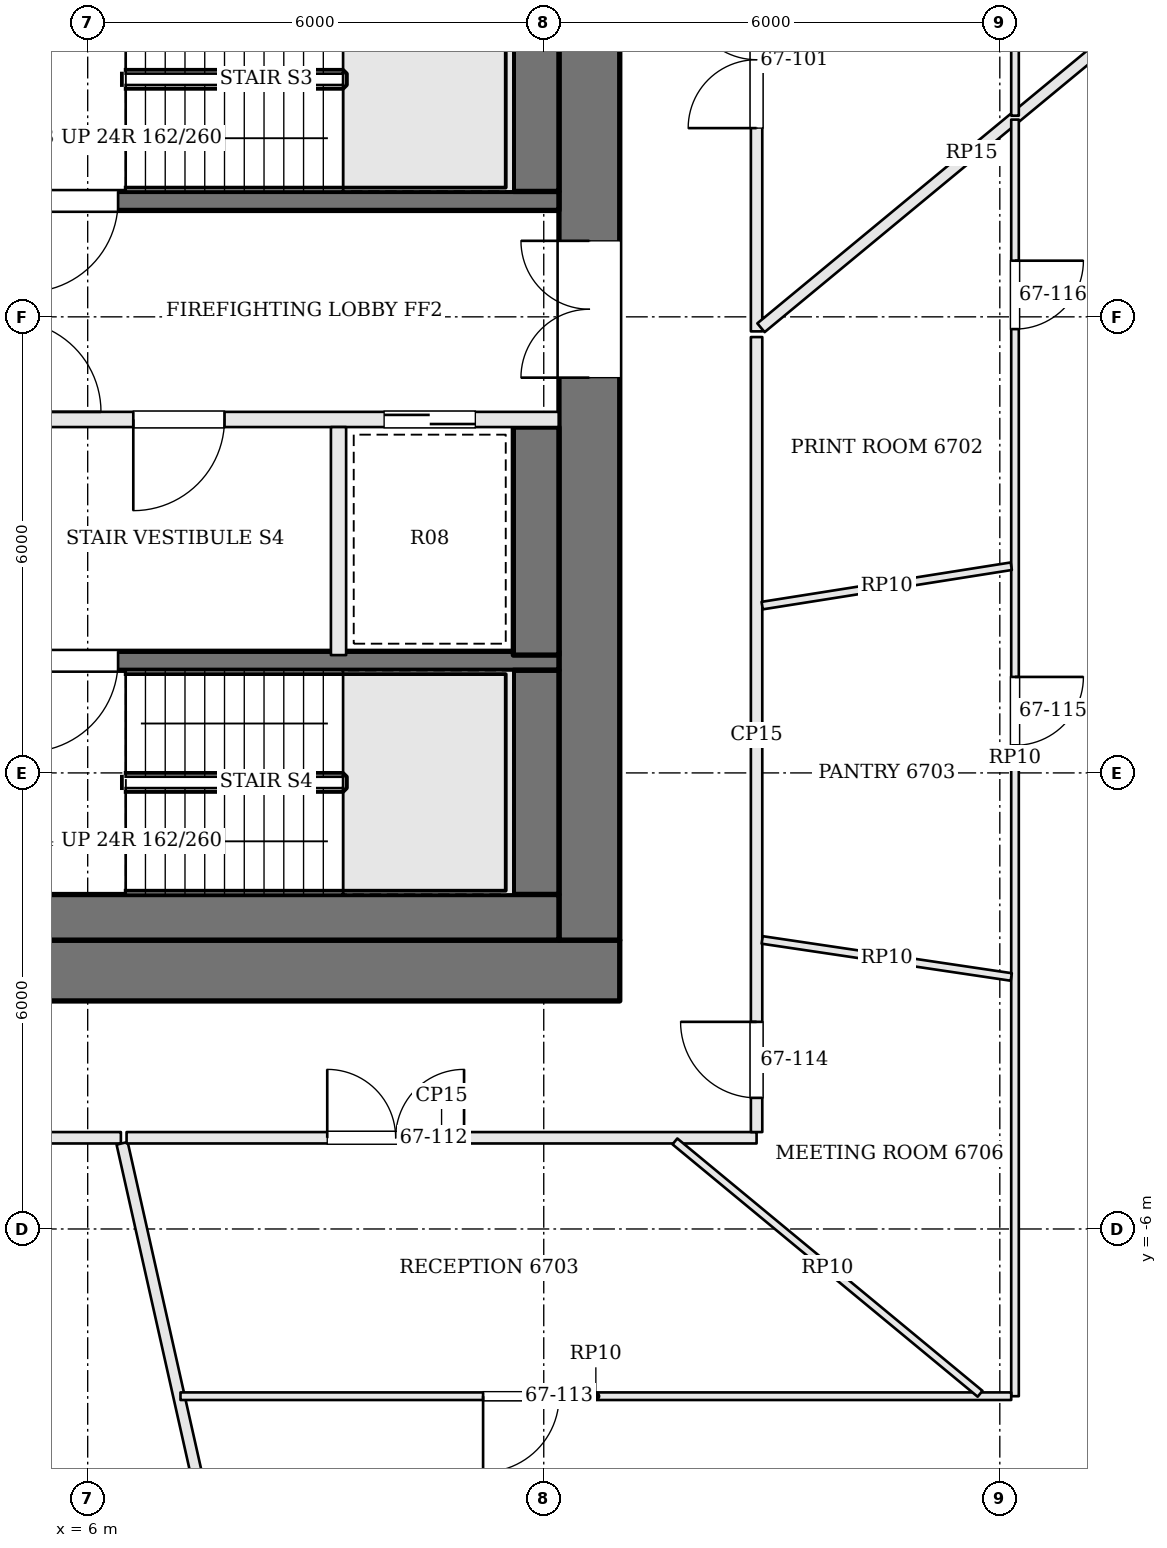
"""IFC4 building model, lengths in metres.
Left out: names, types, materials, properties, quantities, classifications, styles, units other than length and angle.
Written with IfcOpenShell. Run it as: python <this file> out.ifc"""

import sys

from ifc_helpers import new_model, si_unit, direction, frame, frame_2d, origin, place, context, subcontext, project, spatial, rectangle, extrude, element, fill, save


model = new_model("IFC4")
c1 = context("Model", 3, precision=1e-05, world=origin(), true_north=direction((0.0, 1.0)))
c2 = subcontext(c1, "Body", "Model", "MODEL_VIEW")
j1 = project(units=[si_unit("LENGTHUNIT", "METRE"), si_unit("PLANEANGLEUNIT", "RADIAN")], contexts=[c1])
p1 = place(None, origin())
s1 = spatial("IfcSite", under=j1, at=p1, CompositionType="ELEMENT")
p2 = place(p1, origin())
s2 = spatial("IfcBuilding", under=s1, at=p2, CompositionType="ELEMENT")
p3 = place(p2, frame((0.0, 0.0, 272.7)))
s3 = spatial("IfcBuildingStorey", under=s2, at=p3, CompositionType="ELEMENT", Elevation=272.7)
p4 = place(p3, frame((-13.0, -2.6, 0.0), z_axis=(0.0, 0.0, 1.0), x_axis=(1.0, 0.0, 0.0)))
e1 = element("IfcWall", 1, at=p4, inside=s3, PredefinedType="SHEAR", context=c2, shape_type="SweptSolid", body=[
    extrude(rectangle(XDim=26.0, YDim=0.8, at=frame_2d((13.0, 0.0))), origin(), (0.0, 0.0, 1.0), 3.9),
])
p5 = place(p4, frame((9.475, 0.0, 0.0)))
e2 = element("IfcOpeningElement", 2, at=p5, cuts=e1, PredefinedType="OPENING", context=c2, shape_type="SweptSolid", body=[
    extrude(rectangle(XDim=0.9, YDim=2.1, at=frame_2d((0.45, 1.05))), frame((0.0, 0.41, 0.0), z_axis=(0.0, -1.0, 0.0), x_axis=(1.0, 0.0, 0.0)), (0.0, 0.0, 1.0), 0.82),
])
p6 = place(p4, frame((12.75, 0.0, 0.0)))
e3 = element("IfcOpeningElement", 3, at=p6, cuts=e1, PredefinedType="OPENING", context=c2, shape_type="SweptSolid", body=[
    extrude(rectangle(XDim=0.9, YDim=2.1, at=frame_2d((0.45, 1.05))), frame((0.0, 0.41, 0.0), z_axis=(0.0, -1.0, 0.0), x_axis=(1.0, 0.0, 0.0)), (0.0, 0.0, 1.0), 0.82),
])
p7 = place(p4, frame((15.05, 0.0, 0.0)))
e4 = element("IfcOpeningElement", 4, at=p7, cuts=e1, PredefinedType="OPENING", context=c2, shape_type="SweptSolid", body=[
    extrude(rectangle(XDim=1.0, YDim=2.1, at=frame_2d((0.5, 1.05))), frame((0.0, 0.41, 0.0), z_axis=(0.0, -1.0, 0.0), x_axis=(1.0, 0.0, 0.0)), (0.0, 0.0, 1.0), 0.82),
])
p8 = place(p4, frame((16.825, 0.0, 0.0)))
e5 = element("IfcOpeningElement", 5, at=p8, cuts=e1, PredefinedType="OPENING", context=c2, shape_type="SweptSolid", body=[
    extrude(rectangle(XDim=0.7, YDim=2.1, at=frame_2d((0.35, 1.05))), frame((0.0, 0.41, 0.0), z_axis=(0.0, -1.0, 0.0), x_axis=(1.0, 0.0, 0.0)), (0.0, 0.0, 1.0), 0.82),
])
p9 = place(p3, frame((12.6, -2.2, 0.0), z_axis=(0.0, 0.0, 1.0), x_axis=(0.0, 1.0, 0.0)))
e6 = element("IfcWall", 6, at=p9, inside=s3, PredefinedType="SHEAR", context=c2, shape_type="SweptSolid", body=[
    extrude(rectangle(XDim=13.4, YDim=0.8, at=frame_2d((6.7, 0.0))), origin(), (0.0, 0.0, 1.0), 3.9),
])
p10 = place(p9, frame((7.4, 0.0, 0.0)))
e7 = element("IfcOpeningElement", 7, at=p10, cuts=e6, PredefinedType="OPENING", context=c2, shape_type="SweptSolid", body=[
    extrude(rectangle(XDim=1.8, YDim=2.1, at=frame_2d((0.9, 1.05))), frame((0.0, 0.41, 0.0), z_axis=(0.0, -1.0, 0.0), x_axis=(1.0, 0.0, 0.0)), (0.0, 0.0, 1.0), 0.82),
])
p11 = place(p3, frame((12.2, 7.525, 0.0), z_axis=(0.0, 0.0, 1.0), x_axis=(-1.0, 0.0, 0.0)))
e8 = element("IfcWall", 8, at=p11, inside=s3, PredefinedType="SOLIDWALL", context=c2, shape_type="SweptSolid", body=[
    extrude(rectangle(XDim=7.1, YDim=0.25, at=frame_2d((3.55, 0.0))), origin(), (0.0, 0.0, 1.0), 3.7),
])
p12 = place(p11, frame((5.8, 0.0, 0.0)))
e9 = element("IfcOpeningElement", 9, at=p12, cuts=e8, PredefinedType="OPENING", context=c2, shape_type="SweptSolid", body=[
    extrude(rectangle(XDim=1.2, YDim=2.1, at=frame_2d((0.6, 1.05))), frame((0.0, 0.135, 0.0), z_axis=(0.0, -1.0, 0.0), x_axis=(1.0, 0.0, 0.0)), (0.0, 0.0, 1.0), 0.27),
])
p13 = place(p3, frame((12.2, 4.65, 0.0), z_axis=(0.0, 0.0, 1.0), x_axis=(-1.0, 0.0, 0.0)))
e10 = element("IfcWall", 10, at=p13, inside=s3, PredefinedType="SOLIDWALL", context=c2, shape_type="SweptSolid", body=[
    extrude(rectangle(XDim=7.1, YDim=0.2, at=frame_2d((3.55, 0.0))), origin(), (0.0, 0.0, 1.0), 3.7),
])
p14 = place(p13, frame((4.4, 0.0, 0.0)))
e11 = element("IfcOpeningElement", 11, at=p14, cuts=e10, PredefinedType="OPENING", context=c2, shape_type="SweptSolid", body=[
    extrude(rectangle(XDim=1.2, YDim=2.1, at=frame_2d((0.6, 1.05))), frame((0.0, 0.11, 0.0), z_axis=(0.0, -1.0, 0.0), x_axis=(1.0, 0.0, 0.0)), (0.0, 0.0, 1.0), 0.22),
])
p15 = place(p13, frame((1.1, 0.0, 0.0)))
e12 = element("IfcOpeningElement", 12, at=p15, cuts=e10, PredefinedType="OPENING", context=c2, shape_type="SweptSolid", body=[
    extrude(rectangle(XDim=1.2, YDim=2.1, at=frame_2d((0.6, 1.05))), frame((0.0, 0.11, 0.0), z_axis=(0.0, -1.0, 0.0), x_axis=(1.0, 0.0, 0.0)), (0.0, 0.0, 1.0), 0.22),
])
p16 = place(p3, frame((12.2, 1.475, 0.0), z_axis=(0.0, 0.0, 1.0), x_axis=(-1.0, 0.0, 0.0)))
e13 = element("IfcWall", 13, at=p16, inside=s3, PredefinedType="SOLIDWALL", context=c2, shape_type="SweptSolid", body=[
    extrude(rectangle(XDim=7.1, YDim=0.25, at=frame_2d((3.55, 0.0))), origin(), (0.0, 0.0, 1.0), 3.7),
])
p17 = place(p16, frame((5.8, 0.0, 0.0)))
e14 = element("IfcOpeningElement", 14, at=p17, cuts=e13, PredefinedType="OPENING", context=c2, shape_type="SweptSolid", body=[
    extrude(rectangle(XDim=1.2, YDim=2.1, at=frame_2d((0.6, 1.05))), frame((0.0, 0.135, 0.0), z_axis=(0.0, -1.0, 0.0), x_axis=(1.0, 0.0, 0.0)), (0.0, 0.0, 1.0), 0.27),
])
p18 = place(p3, frame((9.3, 4.55, 0.0), z_axis=(0.0, 0.0, 1.0), x_axis=(0.0, -1.0, 0.0)))
e15 = element("IfcWall", 15, at=p18, inside=s3, PredefinedType="SOLIDWALL", context=c2, shape_type="SweptSolid", body=[
    extrude(rectangle(XDim=3.0, YDim=0.2, at=frame_2d((1.5, 0.0))), origin(), (0.0, 0.0, 1.0), 3.7),
])
p19 = place(p3, frame((11.9, 10.6, 0.0), z_axis=(0.0, 0.0, 1.0), x_axis=(0.0, -1.0, 0.0)))
e16 = element("IfcWall", 16, at=p19, inside=s3, PredefinedType="SOLIDWALL", context=c2, shape_type="SweptSolid", body=[
    extrude(rectangle(XDim=2.95, YDim=0.6, at=frame_2d((1.475, 0.0))), origin(), (0.0, 0.0, 1.0), 3.7),
])
p20 = place(p3, frame((11.9, 4.55, 0.0), z_axis=(0.0, 0.0, 1.0), x_axis=(0.0, -1.0, 0.0)))
e17 = element("IfcWall", 17, at=p20, inside=s3, PredefinedType="SOLIDWALL", context=c2, shape_type="SweptSolid", body=[
    extrude(rectangle(XDim=3.0, YDim=0.6, at=frame_2d((1.5, 0.0))), origin(), (0.0, 0.0, 1.0), 3.7),
])
p21 = place(p3, frame((11.9, 1.35, 0.0), z_axis=(0.0, 0.0, 1.0), x_axis=(0.0, -1.0, 0.0)))
e18 = element("IfcWall", 18, at=p21, inside=s3, PredefinedType="SOLIDWALL", context=c2, shape_type="SweptSolid", body=[
    extrude(rectangle(XDim=2.95, YDim=0.6, at=frame_2d((1.475, 0.0))), origin(), (0.0, 0.0, 1.0), 3.7),
])
p22 = place(p3, frame((12.2, -1.9, 0.0), z_axis=(0.0, 0.0, 1.0), x_axis=(-1.0, 0.0, 0.0)))
e19 = element("IfcWall", 19, at=p22, inside=s3, PredefinedType="SOLIDWALL", context=c2, shape_type="SweptSolid", body=[
    extrude(rectangle(XDim=7.1, YDim=0.6, at=frame_2d((3.55, 0.0))), origin(), (0.0, 0.0, 1.0), 3.7),
])
p23 = place(p3, frame((14.8, 5.809, 0.0), z_axis=(0.0, 0.0, 1.0), x_axis=(0.0, 1.0, 0.0)))
e20 = element("IfcWall", 20, at=p23, inside=s3, PredefinedType="PARTITIONING", context=c2, shape_type="SweptSolid", body=[
    extrude(rectangle(XDim=7.991, YDim=0.15, at=frame_2d((3.996, 0.0))), origin(), (0.0, 0.0, 1.0), 3.198),
])
p24 = place(p23, frame((2.674, 0.0, 0.0)))
e21 = element("IfcOpeningElement", 21, at=p24, cuts=e20, PredefinedType="OPENING", context=c2, shape_type="SweptSolid", body=[
    extrude(rectangle(XDim=1.8, YDim=2.1, at=frame_2d((0.9, 1.05))), frame((0.0, 0.085, 0.0), z_axis=(0.0, -1.0, 0.0), x_axis=(1.0, 0.0, 0.0)), (0.0, 0.0, 1.0), 0.17),
])
p25 = place(p3, frame((20.403, 10.442, 0.0), z_axis=(0.0, 0.0, 1.0), x_axis=(-0.770613226955, -0.637303110334, 0.0)))
e22 = element("IfcWall", 22, at=p25, inside=s3, PredefinedType="PARTITIONING", context=c2, shape_type="SweptSolid", body=[
    extrude(rectangle(XDim=7.196, YDim=0.15, at=frame_2d((3.598, 0.0))), origin(), (0.0, 0.0, 1.0), 3.198),
])
p26 = place(p3, frame((-13.76, -4.8, 0.0), z_axis=(0.0, 0.0, 1.0), x_axis=(1.0, 0.0, 0.0)))
e23 = element("IfcWall", 23, at=p26, inside=s3, PredefinedType="PARTITIONING", context=c2, shape_type="SweptSolid", body=[
    extrude(rectangle(XDim=20.197, YDim=0.15, at=frame_2d((10.099, 0.0))), origin(), (0.0, 0.0, 1.0), 3.198),
])
p27 = place(p26, frame((9.161, 0.0, 0.0)))
e24 = element("IfcOpeningElement", 24, at=p27, cuts=e23, PredefinedType="OPENING", context=c2, shape_type="SweptSolid", body=[
    extrude(rectangle(XDim=1.8, YDim=2.1, at=frame_2d((0.9, 1.05))), frame((0.0, 0.085, 0.0), z_axis=(0.0, -1.0, 0.0), x_axis=(1.0, 0.0, 0.0)), (0.0, 0.0, 1.0), 0.17),
])
p28 = place(p3, frame((9.286, -17.485, 0.0), z_axis=(0.0, 0.0, 1.0), x_axis=(-0.219205673421, 0.975678672894, 0.0)))
e25 = element("IfcWall", 25, at=p28, inside=s3, PredefinedType="PARTITIONING", context=c2, shape_type="SweptSolid", body=[
    extrude(rectangle(XDim=12.926, YDim=0.15, at=frame_2d((6.463, 0.0))), origin(), (0.0, 0.0, 1.0), 3.198),
])
p29 = place(p3, frame((6.512, -4.8, 0.0), z_axis=(0.0, 0.0, 1.0), x_axis=(1.0, 0.0, 0.0)))
e26 = element("IfcWall", 26, at=p29, inside=s3, PredefinedType="PARTITIONING", context=c2, shape_type="SweptSolid", body=[
    extrude(rectangle(XDim=8.288, YDim=0.15, at=frame_2d((4.144, 0.0))), origin(), (0.0, 0.0, 1.0), 3.198),
])
p30 = place(p29, frame((2.64, 0.0, 0.0)))
e27 = element("IfcOpeningElement", 27, at=p30, cuts=e26, PredefinedType="OPENING", context=c2, shape_type="SweptSolid", body=[
    extrude(rectangle(XDim=1.8, YDim=2.1, at=frame_2d((0.9, 1.05))), frame((0.0, 0.085, 0.0), z_axis=(0.0, -1.0, 0.0), x_axis=(1.0, 0.0, 0.0)), (0.0, 0.0, 1.0), 0.17),
])
p31 = place(p3, frame((14.8, -4.725, 0.0), z_axis=(0.0, 0.0, 1.0), x_axis=(0.0, 1.0, 0.0)))
e28 = element("IfcWall", 28, at=p31, inside=s3, PredefinedType="PARTITIONING", context=c2, shape_type="SweptSolid", body=[
    extrude(rectangle(XDim=10.459, YDim=0.15, at=frame_2d((5.229, 0.0))), origin(), (0.0, 0.0, 1.0), 3.198),
])
p32 = place(p31, frame((0.45, 0.0, 0.0)))
e29 = element("IfcOpeningElement", 29, at=p32, cuts=e28, PredefinedType="OPENING", context=c2, shape_type="SweptSolid", body=[
    extrude(rectangle(XDim=1.0, YDim=2.4, at=frame_2d((0.5, 1.2))), frame((0.0, 0.085, 0.0), z_axis=(0.0, -1.0, 0.0), x_axis=(1.0, 0.0, 0.0)), (0.0, 0.0, 1.0), 0.17),
])
p33 = place(p3, frame((18.2, 12.158, 0.0), z_axis=(0.0, 0.0, 1.0), x_axis=(0.0, -1.0, 0.0)))
e30 = element("IfcWall", 30, at=p33, inside=s3, PredefinedType="PARTITIONING", context=c2, shape_type="SweptSolid", body=[
    extrude(rectangle(XDim=3.512, YDim=0.1, at=frame_2d((1.756, 0.0))), origin(), (0.0, 0.0, 1.0), 3.184),
])
p34 = place(p3, frame((18.2, 8.595, 0.0), z_axis=(0.0, 0.0, 1.0), x_axis=(0.0, -1.0, 0.0)))
e31 = element("IfcWall", 31, at=p34, inside=s3, PredefinedType="PARTITIONING", context=c2, shape_type="SweptSolid", body=[
    extrude(rectangle(XDim=16.795, YDim=0.1, at=frame_2d((8.397, 0.0))), origin(), (0.0, 0.0, 1.0), 3.184),
])
p35 = place(p34, frame((7.332, 0.0, 0.0)))
e32 = element("IfcOpeningElement", 32, at=p35, cuts=e31, PredefinedType="OPENING", context=c2, shape_type="SweptSolid", body=[
    extrude(rectangle(XDim=0.9, YDim=2.1, at=frame_2d((0.45, 1.05))), frame((0.0, 0.06, 0.0), z_axis=(0.0, -1.0, 0.0), x_axis=(1.0, 0.0, 0.0)), (0.0, 0.0, 1.0), 0.12),
])
p36 = place(p34, frame((1.856, 0.0, 0.0)))
e33 = element("IfcOpeningElement", 33, at=p36, cuts=e31, PredefinedType="OPENING", context=c2, shape_type="SweptSolid", body=[
    extrude(rectangle(XDim=0.9, YDim=2.1, at=frame_2d((0.45, 1.05))), frame((0.0, 0.06, 0.0), z_axis=(0.0, -1.0, 0.0), x_axis=(1.0, 0.0, 0.0)), (0.0, 0.0, 1.0), 0.12),
])
p37 = place(p3, frame((18.15, -8.2, 0.0), z_axis=(0.0, 0.0, 1.0), x_axis=(-1.0, 0.0, 0.0)))
e34 = element("IfcWall", 34, at=p37, inside=s3, PredefinedType="PARTITIONING", context=c2, shape_type="SweptSolid", body=[
    extrude(rectangle(XDim=10.929, YDim=0.1, at=frame_2d((5.464, 0.0))), origin(), (0.0, 0.0, 1.0), 3.184),
])
p38 = place(p37, frame((5.948, 0.0, 0.0)))
e35 = element("IfcOpeningElement", 35, at=p38, cuts=e34, PredefinedType="OPENING", context=c2, shape_type="SweptSolid", body=[
    extrude(rectangle(XDim=1.0, YDim=2.1, at=frame_2d((0.5, 1.05))), frame((0.0, 0.06, 0.0), z_axis=(0.0, -1.0, 0.0), x_axis=(1.0, 0.0, 0.0)), (0.0, 0.0, 1.0), 0.12),
])
p39 = place(p3, frame((13.726, -4.848, 0.0), z_axis=(0.0, 0.0, 1.0), x_axis=(0.770597471598, -0.637322160894, 0.0)))
e36 = element("IfcWall", 36, at=p39, inside=s3, PredefinedType="PARTITIONING", context=c2, shape_type="SweptSolid", body=[
    extrude(rectangle(XDim=5.21, YDim=0.1, at=frame_2d((2.605, 0.0))), origin(), (0.0, 0.0, 1.0), 3.184),
])
p40 = place(p3, frame((14.874, -2.198, 0.0), z_axis=(0.0, 0.0, 1.0), x_axis=(0.989128534105, -0.147053537934, 0.0)))
e37 = element("IfcWall", 37, at=p40, inside=s3, PredefinedType="PARTITIONING", context=c2, shape_type="SweptSolid", body=[
    extrude(rectangle(XDim=3.312, YDim=0.1, at=frame_2d((1.656, 0.0))), origin(), (0.0, 0.0, 1.0), 3.184),
])
p41 = place(p3, frame((14.874, 2.201, 0.0), z_axis=(0.0, 0.0, 1.0), x_axis=(0.987741473675, 0.156098626456, 0.0)))
e38 = element("IfcWall", 38, at=p41, inside=s3, PredefinedType="PARTITIONING", context=c2, shape_type="SweptSolid", body=[
    extrude(rectangle(XDim=3.317, YDim=0.1, at=frame_2d((1.659, 0.0))), origin(), (0.0, 0.0, 1.0), 3.184),
])
p42 = place(p10, origin())
e39 = element("IfcDoor", 39, at=p42, inside=s3, OperationType="DOUBLE_DOOR_SINGLE_SWING", PredefinedType="DOOR", context=c2, shape_type="SweptSolid", body=[
    extrude(rectangle(XDim=1.8, YDim=2.1, at=frame_2d((0.9, 1.05))), frame((0.0, 0.025, 0.0), z_axis=(0.0, -1.0, 0.0), x_axis=(1.0, 0.0, 0.0)), (0.0, 0.0, 1.0), 0.05),
])
fill(e7, e39)
p43 = place(p14, origin())
e40 = element("IfcDoor", 40, at=p43, inside=s3, OperationType="SINGLE_SWING_RIGHT", PredefinedType="DOOR", context=c2, shape_type="SweptSolid", body=[
    extrude(rectangle(XDim=1.2, YDim=2.1, at=frame_2d((0.6, 1.05))), frame((0.0, 0.025, 0.0), z_axis=(0.0, -1.0, 0.0), x_axis=(1.0, 0.0, 0.0)), (0.0, 0.0, 1.0), 0.05),
])
fill(e11, e40)
p44 = place(p12, origin())
e41 = element("IfcDoor", 41, at=p44, inside=s3, OperationType="SINGLE_SWING_RIGHT", PredefinedType="DOOR", context=c2, shape_type="SweptSolid", body=[
    extrude(rectangle(XDim=1.2, YDim=2.1, at=frame_2d((0.6, 1.05))), frame((0.0, 0.025, 0.0), z_axis=(0.0, -1.0, 0.0), x_axis=(1.0, 0.0, 0.0)), (0.0, 0.0, 1.0), 0.05),
])
fill(e9, e41)
p45 = place(p17, origin())
e42 = element("IfcDoor", 42, at=p45, inside=s3, OperationType="SINGLE_SWING_RIGHT", PredefinedType="DOOR", context=c2, shape_type="SweptSolid", body=[
    extrude(rectangle(XDim=1.2, YDim=2.1, at=frame_2d((0.6, 1.05))), frame((0.0, 0.025, 0.0), z_axis=(0.0, -1.0, 0.0), x_axis=(1.0, 0.0, 0.0)), (0.0, 0.0, 1.0), 0.05),
])
fill(e14, e42)
p46 = place(p15, origin())
e43 = element("IfcDoor", 43, at=p46, inside=s3, OperationType="SLIDING_TO_RIGHT", PredefinedType="DOOR", context=c2, shape_type="SweptSolid", body=[
    extrude(rectangle(XDim=1.2, YDim=2.1, at=frame_2d((0.6, 1.05))), frame((0.0, 0.025, 0.0), z_axis=(0.0, -1.0, 0.0), x_axis=(1.0, 0.0, 0.0)), (0.0, 0.0, 1.0), 0.05),
])
fill(e12, e43)
p47 = place(p24, origin())
e44 = element("IfcDoor", 44, at=p47, inside=s3, OperationType="DOUBLE_DOOR_SINGLE_SWING", PredefinedType="DOOR", context=c2, shape_type="SweptSolid", body=[
    extrude(rectangle(XDim=1.8, YDim=2.1, at=frame_2d((0.9, 1.05))), frame((0.0, 0.025, 0.0), z_axis=(0.0, -1.0, 0.0), x_axis=(1.0, 0.0, 0.0)), (0.0, 0.0, 1.0), 0.05),
])
fill(e21, e44)
p48 = place(p30, origin())
e45 = element("IfcDoor", 45, at=p48, inside=s3, OperationType="DOUBLE_DOOR_SINGLE_SWING", PredefinedType="DOOR", context=c2, shape_type="SweptSolid", body=[
    extrude(rectangle(XDim=1.8, YDim=2.1, at=frame_2d((0.9, 1.05))), frame((0.0, 0.025, 0.0), z_axis=(0.0, -1.0, 0.0), x_axis=(1.0, 0.0, 0.0)), (0.0, 0.0, 1.0), 0.05),
])
fill(e27, e45)
p49 = place(p38, origin())
e46 = element("IfcDoor", 46, at=p49, inside=s3, OperationType="SINGLE_SWING_RIGHT", PredefinedType="DOOR", context=c2, shape_type="SweptSolid", body=[
    extrude(rectangle(XDim=1.0, YDim=2.1, at=frame_2d((0.5, 1.05))), frame((0.0, 0.025, 0.0), z_axis=(0.0, -1.0, 0.0), x_axis=(1.0, 0.0, 0.0)), (0.0, 0.0, 1.0), 0.05),
])
fill(e35, e46)
p50 = place(p32, origin())
e47 = element("IfcDoor", 47, at=p50, inside=s3, OperationType="SINGLE_SWING_RIGHT", PredefinedType="DOOR", context=c2, shape_type="SweptSolid", body=[
    extrude(rectangle(XDim=1.0, YDim=2.4, at=frame_2d((0.5, 1.2))), frame((0.0, 0.025, 0.0), z_axis=(0.0, -1.0, 0.0), x_axis=(1.0, 0.0, 0.0)), (0.0, 0.0, 1.0), 0.05),
])
fill(e29, e47)
p51 = place(p35, origin())
e48 = element("IfcDoor", 48, at=p51, inside=s3, OperationType="SINGLE_SWING_LEFT", PredefinedType="DOOR", context=c2, shape_type="SweptSolid", body=[
    extrude(rectangle(XDim=0.9, YDim=2.1, at=frame_2d((0.45, 1.05))), frame((0.0, 0.025, 0.0), z_axis=(0.0, -1.0, 0.0), x_axis=(1.0, 0.0, 0.0)), (0.0, 0.0, 1.0), 0.05),
])
fill(e32, e48)
p52 = place(p36, origin())
e49 = element("IfcDoor", 49, at=p52, inside=s3, OperationType="SINGLE_SWING_LEFT", PredefinedType="DOOR", context=c2, shape_type="SweptSolid", body=[
    extrude(rectangle(XDim=0.9, YDim=2.1, at=frame_2d((0.45, 1.05))), frame((0.0, 0.025, 0.0), z_axis=(0.0, -1.0, 0.0), x_axis=(1.0, 0.0, 0.0)), (0.0, 0.0, 1.0), 0.05),
])
fill(e33, e49)
save(model, sys.argv[1])
